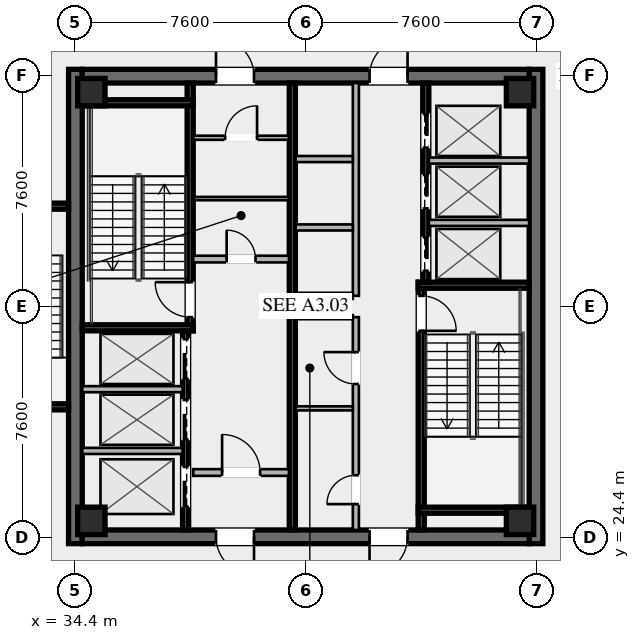
"""IFC4 building model, lengths in metres.
Left out: names, types, materials, properties, quantities, classifications, styles, units other than length and angle.
Written with IfcOpenShell. Run it as: python <this file> out.ifc"""

import sys

from ifc_helpers import new_model, si_unit, direction, frame, frame_2d, origin, origin_2d, place, context, subcontext, project, spatial, rectangle, hollow_rectangle, extrude, element, fill, save


model = new_model("IFC4")
c1 = context("Model", 3, precision=1e-05, world=origin(), true_north=direction((0.0, 1.0)))
c2 = subcontext(c1, "Body", "Model", "MODEL_VIEW")
j1 = project(units=[si_unit("LENGTHUNIT", "METRE"), si_unit("PLANEANGLEUNIT", "RADIAN")], contexts=[c1])
p1 = place(None, origin())
s1 = spatial("IfcSite", under=j1, at=p1, CompositionType="ELEMENT")
p2 = place(p1, origin())
s2 = spatial("IfcBuilding", under=s1, at=p2, CompositionType="ELEMENT")
p3 = place(p2, frame((0.0, 0.0, 199.6)))
s3 = spatial("IfcBuildingStorey", under=s2, at=p3, CompositionType="ELEMENT", Elevation=199.6)
for number, where, z_axis, x_axis in (
    (1, (34.425, 24.2, 0.0), (0.0, 0.0, 1.0), (0.0, 1.0, 0.0)),
    (2, (49.575, 39.8, 0.0), (0.0, 0.0, 1.0), (0.0, -1.0, 0.0)),
):
    element("IfcWall", number, at=place(p3, frame(where, z_axis=z_axis, x_axis=x_axis)), inside=s3, PredefinedType="SHEAR", context=c2, shape_type="SweptSolid", body=[
        extrude(rectangle(XDim=15.6, YDim=0.45, at=frame_2d((7.8, 0.0))), origin(), (0.0, 0.0, 1.0), 4.6),
    ])
p4 = place(p3, frame((49.35, 24.425, 0.0), z_axis=(0.0, 0.0, 1.0), x_axis=(-1.0, 0.0, 0.0)))
e3 = element("IfcWall", 3, at=p4, inside=s3, PredefinedType="SHEAR", context=c2, shape_type="SweptSolid", body=[
    extrude(rectangle(XDim=14.7, YDim=0.45, at=frame_2d((7.35, 0.0))), origin(), (0.0, 0.0, 1.0), 4.6),
])
p5 = place(p4, frame((9.05, 0.0, 0.0)))
e4 = element("IfcOpeningElement", 4, at=p5, cuts=e3, PredefinedType="OPENING", context=c2, shape_type="SweptSolid", body=[
    extrude(rectangle(XDim=1.25, YDim=2.25, at=frame_2d((0.625, 1.125))), frame((0.0, 0.235, 0.0), z_axis=(0.0, -1.0, 0.0), x_axis=(1.0, 0.0, 0.0)), (0.0, 0.0, 1.0), 0.47),
])
p6 = place(p4, frame((4.0, 0.0, 0.0)))
e5 = element("IfcOpeningElement", 5, at=p6, cuts=e3, PredefinedType="OPENING", context=c2, shape_type="SweptSolid", body=[
    extrude(rectangle(XDim=1.25, YDim=2.25, at=frame_2d((0.625, 1.125))), frame((0.0, 0.235, 0.0), z_axis=(0.0, -1.0, 0.0), x_axis=(1.0, 0.0, 0.0)), (0.0, 0.0, 1.0), 0.47),
])
p7 = place(p3, frame((34.65, 39.575, 0.0), z_axis=(0.0, 0.0, 1.0), x_axis=(1.0, 0.0, 0.0)))
e6 = element("IfcWall", 6, at=p7, inside=s3, PredefinedType="SHEAR", context=c2, shape_type="SweptSolid", body=[
    extrude(rectangle(XDim=14.7, YDim=0.45, at=frame_2d((7.35, 0.0))), origin(), (0.0, 0.0, 1.0), 4.6),
])
p8 = place(p7, frame((4.4, 0.0, 0.0)))
e7 = element("IfcOpeningElement", 7, at=p8, cuts=e6, PredefinedType="OPENING", context=c2, shape_type="SweptSolid", body=[
    extrude(rectangle(XDim=1.25, YDim=2.25, at=frame_2d((0.625, 1.125))), frame((0.0, 0.235, 0.0), z_axis=(0.0, -1.0, 0.0), x_axis=(1.0, 0.0, 0.0)), (0.0, 0.0, 1.0), 0.47),
])
p9 = place(p7, frame((9.45, 0.0, 0.0)))
e8 = element("IfcOpeningElement", 8, at=p9, cuts=e6, PredefinedType="OPENING", context=c2, shape_type="SweptSolid", body=[
    extrude(rectangle(XDim=1.25, YDim=2.25, at=frame_2d((0.625, 1.125))), frame((0.0, 0.235, 0.0), z_axis=(0.0, -1.0, 0.0), x_axis=(1.0, 0.0, 0.0)), (0.0, 0.0, 1.0), 0.47),
])
for number, where, z_axis, x_axis in (
    (9, (34.95, 24.95, 0.0), (0.0, 0.0, 1.0), (1.0, 0.0, 0.0)),
    (10, (49.05, 24.95, 0.0), (0.0, 0.0, 1.0), (1.0, 0.0, 0.0)),
    (11, (49.05, 39.05, 0.0), (0.0, 0.0, 1.0), (1.0, 0.0, 0.0)),
    (12, (34.95, 39.05, 0.0), (0.0, 0.0, 1.0), (1.0, 0.0, 0.0)),
):
    element("IfcColumn", number, at=place(p3, frame(where, z_axis=z_axis, x_axis=x_axis)), inside=s3, PredefinedType="COLUMN", context=c2, shape_type="SweptSolid", body=[
        extrude(hollow_rectangle(XDim=0.9, YDim=0.9, WallThickness=0.04, at=origin_2d()), origin(), (0.0, 0.0, 1.0), 4.42),
    ])
p10 = place(p3, frame((38.2, 31.2, 0.0), z_axis=(0.0, 0.0, 1.0), x_axis=(0.0, 1.0, 0.0)))
e13 = element("IfcWall", 13, at=p10, inside=s3, PredefinedType="SHEAR", context=c2, shape_type="SweptSolid", body=[
    extrude(rectangle(XDim=8.15, YDim=0.2, at=frame_2d((4.075, 0.0))), origin(), (0.0, 0.0, 1.0), 4.42),
])
p11 = place(p10, frame((0.45, 0.0, 0.0)))
e14 = element("IfcOpeningElement", 14, at=p11, cuts=e13, PredefinedType="OPENING", context=c2, shape_type="SweptSolid", body=[
    extrude(rectangle(XDim=1.15, YDim=2.2, at=frame_2d((0.575, 1.1))), frame((0.0, 0.11, 0.0), z_axis=(0.0, -1.0, 0.0), x_axis=(1.0, 0.0, 0.0)), (0.0, 0.0, 1.0), 0.22),
])
for number, where, z_axis, x_axis in (
    (15, (34.65, 31.3, 0.0), (0.0, 0.0, 1.0), (1.0, 0.0, 0.0)),
    (16, (34.65, 38.7, 0.0), (0.0, 0.0, 1.0), (1.0, 0.0, 0.0)),
):
    element("IfcWall", number, at=place(p3, frame(where, z_axis=z_axis, x_axis=x_axis)), inside=s3, PredefinedType="SHEAR", context=c2, shape_type="SweptSolid", body=[
        extrude(rectangle(XDim=3.65, YDim=0.2, at=frame_2d((1.825, 0.0))), origin(), (0.0, 0.0, 1.0), 4.42),
    ])
p12 = place(p3, frame((45.8, 32.8, 0.0), z_axis=(0.0, 0.0, 1.0), x_axis=(0.0, -1.0, 0.0)))
e17 = element("IfcWall", 17, at=p12, inside=s3, PredefinedType="SHEAR", context=c2, shape_type="SweptSolid", body=[
    extrude(rectangle(XDim=8.15, YDim=0.2, at=frame_2d((4.075, 0.0))), origin(), (0.0, 0.0, 1.0), 4.42),
])
p13 = place(p12, frame((0.45, 0.0, 0.0)))
e18 = element("IfcOpeningElement", 18, at=p13, cuts=e17, PredefinedType="OPENING", context=c2, shape_type="SweptSolid", body=[
    extrude(rectangle(XDim=1.15, YDim=2.2, at=frame_2d((0.575, 1.1))), frame((0.0, 0.11, 0.0), z_axis=(0.0, -1.0, 0.0), x_axis=(1.0, 0.0, 0.0)), (0.0, 0.0, 1.0), 0.22),
])
for number, where, z_axis, x_axis in (
    (19, (45.7, 32.7, 0.0), (0.0, 0.0, 1.0), (1.0, 0.0, 0.0)),
    (20, (45.7, 25.3, 0.0), (0.0, 0.0, 1.0), (1.0, 0.0, 0.0)),
):
    element("IfcWall", number, at=place(p3, frame(where, z_axis=z_axis, x_axis=x_axis)), inside=s3, PredefinedType="SHEAR", context=c2, shape_type="SweptSolid", body=[
        extrude(rectangle(XDim=3.65, YDim=0.2, at=frame_2d((1.825, 0.0))), origin(), (0.0, 0.0, 1.0), 4.42),
    ])
p14 = place(p3, frame((41.56, 24.65, 0.0), z_axis=(0.0, 0.0, 1.0), x_axis=(0.0, 1.0, 0.0)))
e21 = element("IfcWall", 21, at=p14, inside=s3, PredefinedType="SHEAR", context=c2, shape_type="SweptSolid", body=[
    extrude(rectangle(XDim=14.7, YDim=0.2, at=frame_2d((7.35, 0.0))), origin(), (0.0, 0.0, 1.0), 4.42),
])
p15 = place(p3, frame((38.3, 33.56, 0.0), z_axis=(0.0, 0.0, 1.0), x_axis=(1.0, 0.0, 0.0)))
e22 = element("IfcWall", 22, at=p15, inside=s3, PredefinedType="SOLIDWALL", context=c2, shape_type="SweptSolid", body=[
    extrude(rectangle(XDim=3.15, YDim=0.22, at=frame_2d((1.575, 0.0))), origin(), (0.0, 0.0, 1.0), 3.531),
])
p16 = place(p15, frame((1.1, 0.0, 0.0)))
e23 = element("IfcOpeningElement", 23, at=p16, cuts=e22, PredefinedType="OPENING", context=c2, shape_type="SweptSolid", body=[
    extrude(rectangle(XDim=0.95, YDim=2.05, at=frame_2d((0.475, 1.025))), frame((0.0, 0.12, 0.0), z_axis=(0.0, -1.0, 0.0), x_axis=(1.0, 0.0, 0.0)), (0.0, 0.0, 1.0), 0.24),
])
p17 = place(p3, frame((38.3, 26.54, 0.0), z_axis=(0.0, 0.0, 1.0), x_axis=(1.0, 0.0, 0.0)))
e24 = element("IfcWall", 24, at=p17, inside=s3, PredefinedType="SOLIDWALL", context=c2, shape_type="SweptSolid", body=[
    extrude(rectangle(XDim=3.15, YDim=0.22, at=frame_2d((1.575, 0.0))), origin(), (0.0, 0.0, 1.0), 3.531),
])
p18 = place(p17, frame((0.95, 0.0, 0.0)))
e25 = element("IfcOpeningElement", 25, at=p18, cuts=e24, PredefinedType="OPENING", context=c2, shape_type="SweptSolid", body=[
    extrude(rectangle(XDim=1.25, YDim=2.25, at=frame_2d((0.625, 1.125))), frame((0.0, 0.12, 0.0), z_axis=(0.0, -1.0, 0.0), x_axis=(1.0, 0.0, 0.0)), (0.0, 0.0, 1.0), 0.24),
])
p19 = place(p3, frame((38.05, 24.65, 0.0), z_axis=(0.0, 0.0, 1.0), x_axis=(0.0, 1.0, 0.0)))
e26 = element("IfcWall", 26, at=p19, inside=s3, PredefinedType="SHEAR", context=c2, shape_type="SweptSolid", body=[
    extrude(rectangle(XDim=6.55, YDim=0.2, at=frame_2d((3.275, 0.0))), origin(), (0.0, 0.0, 1.0), 4.42),
])
p20 = place(p19, frame((4.975, 0.0, 0.0)))
e27 = element("IfcOpeningElement", 27, at=p20, cuts=e26, PredefinedType="OPENING", context=c2, shape_type="SweptSolid", body=[
    extrude(rectangle(XDim=1.3, YDim=2.25, at=frame_2d((0.65, 1.125))), frame((0.0, 0.11, 0.0), z_axis=(0.0, -1.0, 0.0), x_axis=(1.0, 0.0, 0.0)), (0.0, 0.0, 1.0), 0.22),
])
p21 = place(p19, frame((2.975, 0.0, 0.0)))
e28 = element("IfcOpeningElement", 28, at=p21, cuts=e26, PredefinedType="OPENING", context=c2, shape_type="SweptSolid", body=[
    extrude(rectangle(XDim=1.3, YDim=2.25, at=frame_2d((0.65, 1.125))), frame((0.0, 0.11, 0.0), z_axis=(0.0, -1.0, 0.0), x_axis=(1.0, 0.0, 0.0)), (0.0, 0.0, 1.0), 0.22),
])
p22 = place(p19, frame((0.775, 0.0, 0.0)))
e29 = element("IfcOpeningElement", 29, at=p22, cuts=e26, PredefinedType="OPENING", context=c2, shape_type="SweptSolid", body=[
    extrude(rectangle(XDim=1.3, YDim=2.25, at=frame_2d((0.65, 1.125))), frame((0.0, 0.11, 0.0), z_axis=(0.0, -1.0, 0.0), x_axis=(1.0, 0.0, 0.0)), (0.0, 0.0, 1.0), 0.22),
])
for number, where, z_axis, x_axis in (
    (30, (34.65, 27.25, 0.0), (0.0, 0.0, 1.0), (1.0, 0.0, 0.0)),
    (31, (34.65, 29.28, 0.0), (0.0, 0.0, 1.0), (1.0, 0.0, 0.0)),
):
    element("IfcWall", number, at=place(p3, frame(where, z_axis=z_axis, x_axis=x_axis)), inside=s3, PredefinedType="SOLIDWALL", context=c2, shape_type="SweptSolid", body=[
        extrude(rectangle(XDim=3.3, YDim=0.2, at=frame_2d((1.65, 0.0))), origin(), (0.0, 0.0, 1.0), 4.42),
    ])
p23 = place(p3, frame((45.95, 39.35, 0.0), z_axis=(0.0, 0.0, 1.0), x_axis=(0.0, -1.0, 0.0)))
e32 = element("IfcWall", 32, at=p23, inside=s3, PredefinedType="SHEAR", context=c2, shape_type="SweptSolid", body=[
    extrude(rectangle(XDim=6.55, YDim=0.2, at=frame_2d((3.275, 0.0))), origin(), (0.0, 0.0, 1.0), 4.42),
])
p24 = place(p23, frame((5.075, 0.0, 0.0)))
e33 = element("IfcOpeningElement", 33, at=p24, cuts=e32, PredefinedType="OPENING", context=c2, shape_type="SweptSolid", body=[
    extrude(rectangle(XDim=1.1, YDim=2.2, at=frame_2d((0.55, 1.1))), frame((0.0, 0.11, 0.0), z_axis=(0.0, -1.0, 0.0), x_axis=(1.0, 0.0, 0.0)), (0.0, 0.0, 1.0), 0.22),
])
p25 = place(p23, frame((3.025, 0.0, 0.0)))
e34 = element("IfcOpeningElement", 34, at=p25, cuts=e32, PredefinedType="OPENING", context=c2, shape_type="SweptSolid", body=[
    extrude(rectangle(XDim=1.1, YDim=2.2, at=frame_2d((0.55, 1.1))), frame((0.0, 0.11, 0.0), z_axis=(0.0, -1.0, 0.0), x_axis=(1.0, 0.0, 0.0)), (0.0, 0.0, 1.0), 0.22),
])
p26 = place(p23, frame((1.025, 0.0, 0.0)))
e35 = element("IfcOpeningElement", 35, at=p26, cuts=e32, PredefinedType="OPENING", context=c2, shape_type="SweptSolid", body=[
    extrude(rectangle(XDim=1.1, YDim=2.2, at=frame_2d((0.55, 1.1))), frame((0.0, 0.11, 0.0), z_axis=(0.0, -1.0, 0.0), x_axis=(1.0, 0.0, 0.0)), (0.0, 0.0, 1.0), 0.22),
])
for number, where, z_axis, x_axis in (
    (36, (46.05, 34.75, 0.0), (0.0, 0.0, 1.0), (1.0, 0.0, 0.0)),
    (37, (46.05, 36.8, 0.0), (0.0, 0.0, 1.0), (1.0, 0.0, 0.0)),
):
    element("IfcWall", number, at=place(p3, frame(where, z_axis=z_axis, x_axis=x_axis)), inside=s3, PredefinedType="SOLIDWALL", context=c2, shape_type="SweptSolid", body=[
        extrude(rectangle(XDim=3.3, YDim=0.2, at=frame_2d((1.65, 0.0))), origin(), (0.0, 0.0, 1.0), 4.42),
    ])
p27 = place(p3, frame((38.3, 37.55, 0.0), z_axis=(0.0, 0.0, 1.0), x_axis=(1.0, 0.0, 0.0)))
e38 = element("IfcWall", 38, at=p27, inside=s3, PredefinedType="PARTITIONING", context=c2, shape_type="SweptSolid", body=[
    extrude(rectangle(XDim=3.15, YDim=0.135, at=frame_2d((1.575, 0.0))), origin(), (0.0, 0.0, 1.0), 3.531),
])
p28 = place(p27, frame((1.05, 0.0, 0.0)))
e39 = element("IfcOpeningElement", 39, at=p28, cuts=e38, PredefinedType="OPENING", context=c2, shape_type="SweptSolid", body=[
    extrude(rectangle(XDim=1.05, YDim=2.2, at=frame_2d((0.525, 1.1))), frame((0.0, 0.077, 0.0), z_axis=(0.0, -1.0, 0.0), x_axis=(1.0, 0.0, 0.0)), (0.0, 0.0, 1.0), 0.155),
])
p29 = place(p3, frame((38.3, 35.55, 0.0), z_axis=(0.0, 0.0, 1.0), x_axis=(1.0, 0.0, 0.0)))
e40 = element("IfcWall", 40, at=p29, inside=s3, PredefinedType="PARTITIONING", context=c2, shape_type="SweptSolid", body=[
    extrude(rectangle(XDim=3.15, YDim=0.11, at=frame_2d((1.575, 0.0))), origin(), (0.0, 0.0, 1.0), 3.531),
])
p30 = place(p3, frame((43.65, 24.65, 0.0), z_axis=(0.0, 0.0, 1.0), x_axis=(0.0, 1.0, 0.0)))
e41 = element("IfcWall", 41, at=p30, inside=s3, PredefinedType="SOLIDWALL", context=c2, shape_type="SweptSolid", body=[
    extrude(rectangle(XDim=7.0, YDim=0.2, at=frame_2d((3.5, 0.0))), origin(), (0.0, 0.0, 1.0), 3.531),
])
p31 = place(p30, frame((0.85, 0.0, 0.0)))
e42 = element("IfcOpeningElement", 42, at=p31, cuts=e41, PredefinedType="OPENING", context=c2, shape_type="SweptSolid", body=[
    extrude(rectangle(XDim=0.95, YDim=2.05, at=frame_2d((0.475, 1.025))), frame((0.0, 0.11, 0.0), z_axis=(0.0, -1.0, 0.0), x_axis=(1.0, 0.0, 0.0)), (0.0, 0.0, 1.0), 0.22),
])
p32 = place(p30, frame((4.8, 0.0, 0.0)))
e43 = element("IfcOpeningElement", 43, at=p32, cuts=e41, PredefinedType="OPENING", context=c2, shape_type="SweptSolid", body=[
    extrude(rectangle(XDim=1.05, YDim=2.2, at=frame_2d((0.525, 1.1))), frame((0.0, 0.11, 0.0), z_axis=(0.0, -1.0, 0.0), x_axis=(1.0, 0.0, 0.0)), (0.0, 0.0, 1.0), 0.22),
])
for number, where, z_axis, x_axis in (
    (44, (41.67, 31.65, 0.0), (0.0, 0.0, 1.0), (1.0, 0.0, 0.0)),
    (45, (41.67, 28.65, 0.0), (0.0, 0.0, 1.0), (1.0, 0.0, 0.0)),
):
    element("IfcWall", number, at=place(p3, frame(where, z_axis=z_axis, x_axis=x_axis)), inside=s3, PredefinedType="PARTITIONING", context=c2, shape_type="SweptSolid", body=[
        extrude(rectangle(XDim=1.88, YDim=0.135, at=frame_2d((0.94, 0.0))), origin(), (0.0, 0.0, 1.0), 3.531),
    ])
p33 = place(p3, frame((43.65, 32.35, 0.0), z_axis=(0.0, 0.0, 1.0), x_axis=(0.0, 1.0, 0.0)))
e46 = element("IfcWall", 46, at=p33, inside=s3, PredefinedType="SOLIDWALL", context=c2, shape_type="SweptSolid", body=[
    extrude(rectangle(XDim=7.0, YDim=0.2, at=frame_2d((3.5, 0.0))), origin(), (0.0, 0.0, 1.0), 4.42),
])
for number, where, z_axis, x_axis in (
    (47, (41.67, 32.35, 0.0), (0.0, 0.0, 1.0), (1.0, 0.0, 0.0)),
    (48, (41.67, 34.6, 0.0), (0.0, 0.0, 1.0), (1.0, 0.0, 0.0)),
    (49, (41.67, 36.85, 0.0), (0.0, 0.0, 1.0), (1.0, 0.0, 0.0)),
):
    element("IfcWall", number, at=place(p3, frame(where, z_axis=z_axis, x_axis=x_axis)), inside=s3, PredefinedType="SOLIDWALL", context=c2, shape_type="SweptSolid", body=[
        extrude(rectangle(XDim=1.88, YDim=0.2, at=frame_2d((0.94, 0.0))), origin(), (0.0, 0.0, 1.0), 4.42),
    ])
for number, where, z_axis, x_axis in (
    (50, (34.2, 35.3, 0.0), (0.0, 0.0, 1.0), (-1.0, 0.0, 0.0)),
    (51, (30.8, 28.7, 0.0), (0.0, 0.0, 1.0), (1.0, 0.0, 0.0)),
):
    element("IfcWall", number, at=place(p3, frame(where, z_axis=z_axis, x_axis=x_axis)), inside=s3, PredefinedType="SHEAR", context=c2, shape_type="SweptSolid", body=[
        extrude(rectangle(XDim=3.4, YDim=0.2, at=frame_2d((1.7, 0.0))), origin(), (0.0, 0.0, 1.0), 4.42),
    ])
p34 = place(p8, origin())
e52 = element("IfcDoor", 52, at=p34, inside=s3, OperationType="SINGLE_SWING_LEFT", PredefinedType="DOOR", context=c2, shape_type="SweptSolid", body=[
    extrude(rectangle(XDim=1.25, YDim=2.25, at=frame_2d((0.625, 1.125))), frame((0.0, 0.025, 0.0), z_axis=(0.0, -1.0, 0.0), x_axis=(1.0, 0.0, 0.0)), (0.0, 0.0, 1.0), 0.05),
])
fill(e7, e52)
p35 = place(p9, origin())
e53 = element("IfcDoor", 53, at=p35, inside=s3, OperationType="SINGLE_SWING_RIGHT", PredefinedType="DOOR", context=c2, shape_type="SweptSolid", body=[
    extrude(rectangle(XDim=1.25, YDim=2.25, at=frame_2d((0.625, 1.125))), frame((0.0, 0.025, 0.0), z_axis=(0.0, -1.0, 0.0), x_axis=(1.0, 0.0, 0.0)), (0.0, 0.0, 1.0), 0.05),
])
fill(e8, e53)
p36 = place(p5, origin())
e54 = element("IfcDoor", 54, at=p36, inside=s3, OperationType="SINGLE_SWING_LEFT", PredefinedType="DOOR", context=c2, shape_type="SweptSolid", body=[
    extrude(rectangle(XDim=1.25, YDim=2.25, at=frame_2d((0.625, 1.125))), frame((0.0, 0.025, 0.0), z_axis=(0.0, -1.0, 0.0), x_axis=(1.0, 0.0, 0.0)), (0.0, 0.0, 1.0), 0.05),
])
fill(e4, e54)
p37 = place(p6, origin())
e55 = element("IfcDoor", 55, at=p37, inside=s3, OperationType="SINGLE_SWING_RIGHT", PredefinedType="DOOR", context=c2, shape_type="SweptSolid", body=[
    extrude(rectangle(XDim=1.25, YDim=2.25, at=frame_2d((0.625, 1.125))), frame((0.0, 0.025, 0.0), z_axis=(0.0, -1.0, 0.0), x_axis=(1.0, 0.0, 0.0)), (0.0, 0.0, 1.0), 0.05),
])
fill(e5, e55)
p38 = place(p11, origin())
e56 = element("IfcDoor", 56, at=p38, inside=s3, OperationType="SINGLE_SWING_RIGHT", PredefinedType="DOOR", context=c2, shape_type="SweptSolid", body=[
    extrude(rectangle(XDim=1.15, YDim=2.2, at=frame_2d((0.575, 1.1))), frame((0.0, 0.025, 0.0), z_axis=(0.0, -1.0, 0.0), x_axis=(1.0, 0.0, 0.0)), (0.0, 0.0, 1.0), 0.05),
])
fill(e14, e56)
p39 = place(p13, origin())
e57 = element("IfcDoor", 57, at=p39, inside=s3, OperationType="SINGLE_SWING_RIGHT", PredefinedType="DOOR", context=c2, shape_type="SweptSolid", body=[
    extrude(rectangle(XDim=1.15, YDim=2.2, at=frame_2d((0.575, 1.1))), frame((0.0, 0.025, 0.0), z_axis=(0.0, -1.0, 0.0), x_axis=(1.0, 0.0, 0.0)), (0.0, 0.0, 1.0), 0.05),
])
fill(e18, e57)
p40 = place(p18, origin())
e58 = element("IfcDoor", 58, at=p40, inside=s3, OperationType="SINGLE_SWING_LEFT", PredefinedType="DOOR", context=c2, shape_type="SweptSolid", body=[
    extrude(rectangle(XDim=1.25, YDim=2.25, at=frame_2d((0.625, 1.125))), frame((0.0, 0.025, 0.0), z_axis=(0.0, -1.0, 0.0), x_axis=(1.0, 0.0, 0.0)), (0.0, 0.0, 1.0), 0.05),
])
fill(e25, e58)
p41 = place(p28, origin())
e59 = element("IfcDoor", 59, at=p41, inside=s3, OperationType="SINGLE_SWING_RIGHT", PredefinedType="DOOR", context=c2, shape_type="SweptSolid", body=[
    extrude(rectangle(XDim=1.05, YDim=2.2, at=frame_2d((0.525, 1.1))), frame((0.0, 0.025, 0.0), z_axis=(0.0, -1.0, 0.0), x_axis=(1.0, 0.0, 0.0)), (0.0, 0.0, 1.0), 0.05),
])
fill(e39, e59)
p42 = place(p16, origin())
e60 = element("IfcDoor", 60, at=p42, inside=s3, OperationType="SINGLE_SWING_LEFT", PredefinedType="DOOR", context=c2, shape_type="SweptSolid", body=[
    extrude(rectangle(XDim=0.95, YDim=2.05, at=frame_2d((0.475, 1.025))), frame((0.0, 0.025, 0.0), z_axis=(0.0, -1.0, 0.0), x_axis=(1.0, 0.0, 0.0)), (0.0, 0.0, 1.0), 0.05),
])
fill(e23, e60)
p43 = place(p31, origin())
e61 = element("IfcDoor", 61, at=p43, inside=s3, OperationType="SINGLE_SWING_LEFT", PredefinedType="DOOR", context=c2, shape_type="SweptSolid", body=[
    extrude(rectangle(XDim=0.95, YDim=2.05, at=frame_2d((0.475, 1.025))), frame((0.0, 0.025, 0.0), z_axis=(0.0, -1.0, 0.0), x_axis=(1.0, 0.0, 0.0)), (0.0, 0.0, 1.0), 0.05),
])
fill(e42, e61)
p44 = place(p32, origin())
e62 = element("IfcDoor", 62, at=p44, inside=s3, OperationType="SINGLE_SWING_RIGHT", PredefinedType="DOOR", context=c2, shape_type="SweptSolid", body=[
    extrude(rectangle(XDim=1.05, YDim=2.2, at=frame_2d((0.525, 1.1))), frame((0.0, 0.025, 0.0), z_axis=(0.0, -1.0, 0.0), x_axis=(1.0, 0.0, 0.0)), (0.0, 0.0, 1.0), 0.05),
])
fill(e43, e62)
p45 = place(p20, origin())
e63 = element("IfcDoor", 63, at=p45, inside=s3, OperationType="SLIDING_TO_LEFT", PredefinedType="DOOR", context=c2, shape_type="SweptSolid", body=[
    extrude(rectangle(XDim=1.3, YDim=2.25, at=frame_2d((0.65, 1.125))), frame((0.0, 0.025, 0.0), z_axis=(0.0, -1.0, 0.0), x_axis=(1.0, 0.0, 0.0)), (0.0, 0.0, 1.0), 0.05),
])
fill(e27, e63)
p46 = place(p21, origin())
e64 = element("IfcDoor", 64, at=p46, inside=s3, OperationType="SLIDING_TO_LEFT", PredefinedType="DOOR", context=c2, shape_type="SweptSolid", body=[
    extrude(rectangle(XDim=1.3, YDim=2.25, at=frame_2d((0.65, 1.125))), frame((0.0, 0.025, 0.0), z_axis=(0.0, -1.0, 0.0), x_axis=(1.0, 0.0, 0.0)), (0.0, 0.0, 1.0), 0.05),
])
fill(e28, e64)
p47 = place(p22, origin())
e65 = element("IfcDoor", 65, at=p47, inside=s3, OperationType="SLIDING_TO_LEFT", PredefinedType="DOOR", context=c2, shape_type="SweptSolid", body=[
    extrude(rectangle(XDim=1.3, YDim=2.25, at=frame_2d((0.65, 1.125))), frame((0.0, 0.025, 0.0), z_axis=(0.0, -1.0, 0.0), x_axis=(1.0, 0.0, 0.0)), (0.0, 0.0, 1.0), 0.05),
])
fill(e29, e65)
p48 = place(p24, origin())
e66 = element("IfcDoor", 66, at=p48, inside=s3, OperationType="SLIDING_TO_LEFT", PredefinedType="DOOR", context=c2, shape_type="SweptSolid", body=[
    extrude(rectangle(XDim=1.1, YDim=2.2, at=frame_2d((0.55, 1.1))), frame((0.0, 0.025, 0.0), z_axis=(0.0, -1.0, 0.0), x_axis=(1.0, 0.0, 0.0)), (0.0, 0.0, 1.0), 0.05),
])
fill(e33, e66)
p49 = place(p25, origin())
e67 = element("IfcDoor", 67, at=p49, inside=s3, OperationType="SLIDING_TO_LEFT", PredefinedType="DOOR", context=c2, shape_type="SweptSolid", body=[
    extrude(rectangle(XDim=1.1, YDim=2.2, at=frame_2d((0.55, 1.1))), frame((0.0, 0.025, 0.0), z_axis=(0.0, -1.0, 0.0), x_axis=(1.0, 0.0, 0.0)), (0.0, 0.0, 1.0), 0.05),
])
fill(e34, e67)
p50 = place(p26, origin())
e68 = element("IfcDoor", 68, at=p50, inside=s3, OperationType="SLIDING_TO_LEFT", PredefinedType="DOOR", context=c2, shape_type="SweptSolid", body=[
    extrude(rectangle(XDim=1.1, YDim=2.2, at=frame_2d((0.55, 1.1))), frame((0.0, 0.025, 0.0), z_axis=(0.0, -1.0, 0.0), x_axis=(1.0, 0.0, 0.0)), (0.0, 0.0, 1.0), 0.05),
])
fill(e35, e68)
save(model, sys.argv[1])
